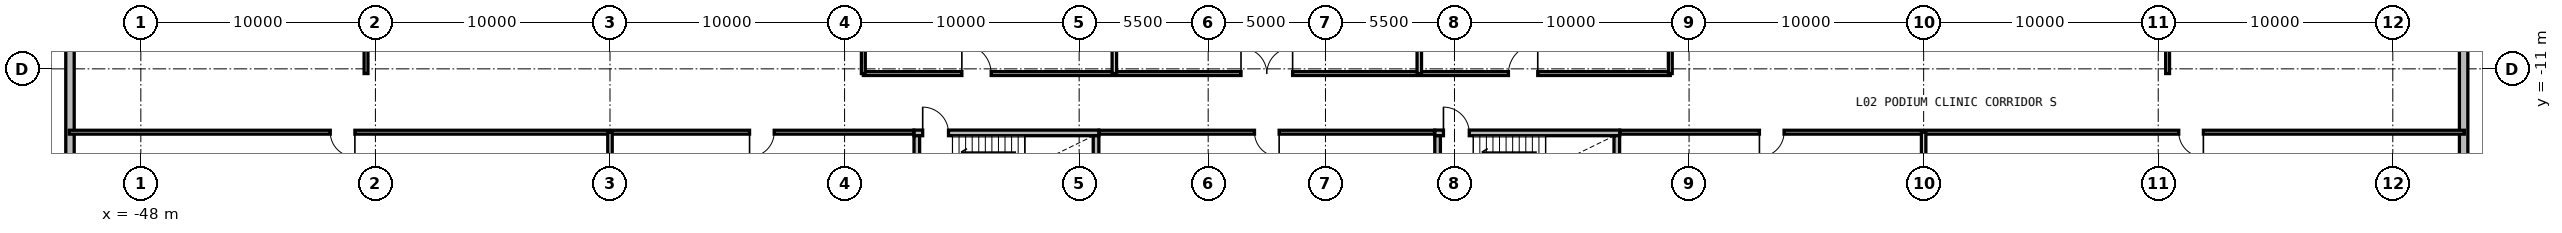
"""IFC4 building model, lengths in metres.
Left out: names, types, materials, properties, quantities, classifications, styles, units other than length and angle.
Written with IfcOpenShell. Run it as: python <this file> out.ifc"""

import sys

from ifc_helpers import new_model, si_unit, direction, frame, frame_2d, origin, place, context, subcontext, project, spatial, rectangle, extrude, source, transform, mapped, element, fill, save


model = new_model("IFC4")
c1 = context("Model", 3, precision=1e-05, world=origin(), true_north=direction((0.0, 1.0)))
c2 = subcontext(c1, "Body", "Model", "MODEL_VIEW")
j1 = project(units=[si_unit("LENGTHUNIT", "METRE"), si_unit("PLANEANGLEUNIT", "RADIAN")], contexts=[c1])
p1 = place(None, origin())
s1 = spatial("IfcSite", under=j1, at=p1, CompositionType="ELEMENT")
p2 = place(p1, origin())
s2 = spatial("IfcBuilding", under=s1, at=p2, CompositionType="ELEMENT")
p3 = place(p2, frame((0.0, 0.0, 8.4)))
s3 = spatial("IfcBuildingStorey", under=s2, at=p3, CompositionType="ELEMENT", Elevation=8.4)
m1 = source(origin(), c2, "Body", "SweptSolid", [
    extrude(rectangle(XDim=43.44, YDim=0.36, at=frame_2d((21.72, 0.0))), origin(), (0.0, 0.0, 1.0), 3.88),
])
p4 = place(p3, frame((-51.02, -21.72, 0.0), z_axis=(0.0, 0.0, 1.0), x_axis=(0.0, 1.0, 0.0)))
e1 = element("IfcWall", 1, at=p4, inside=s3, PredefinedType="SOLIDWALL", context=c2, shape_type="MappedRepresentation", body=[
    mapped(m1, transform((0.0, 0.0, 0.0), x_axis=(1.0, 0.0, 0.0), y_axis=(0.0, 1.0, 0.0), z_axis=(0.0, 0.0, 1.0), scale=1.0)),
])
p5 = place(p4, frame((4.0, 0.0, 0.9)))
e2 = element("IfcOpeningElement", 2, at=p5, cuts=e1, PredefinedType="OPENING", context=c2, shape_type="SweptSolid", body=[
    extrude(rectangle(XDim=1.8, YDim=2.0, at=frame_2d((0.9, 1.0))), frame((0.0, 0.19, 0.0), z_axis=(0.0, -1.0, 0.0), x_axis=(1.0, 0.0, 0.0)), (0.0, 0.0, 1.0), 0.38),
])
p6 = place(p4, frame((12.4, 0.0, 0.85)))
e3 = element("IfcOpeningElement", 3, at=p6, cuts=e1, PredefinedType="OPENING", context=c2, shape_type="SweptSolid", body=[
    extrude(rectangle(XDim=2.4, YDim=2.2, at=frame_2d((1.2, 1.1))), frame((0.0, 0.19, 0.0), z_axis=(0.0, -1.0, 0.0), x_axis=(1.0, 0.0, 0.0)), (0.0, 0.0, 1.0), 0.38),
])
p7 = place(p3, frame((51.02, 21.72, 0.0), z_axis=(0.0, 0.0, 1.0), x_axis=(0.0, -1.0, 0.0)))
e4 = element("IfcWall", 4, at=p7, inside=s3, PredefinedType="SOLIDWALL", context=c2, shape_type="MappedRepresentation", body=[
    mapped(m1, transform((0.0, 0.0, 0.0), x_axis=(1.0, 0.0, 0.0), y_axis=(0.0, 1.0, 0.0), z_axis=(0.0, 0.0, 1.0), scale=1.0)),
])
p8 = place(p7, frame((4.0, 0.0, 0.9)))
e5 = element("IfcOpeningElement", 5, at=p8, cuts=e4, PredefinedType="OPENING", context=c2, shape_type="SweptSolid", body=[
    extrude(rectangle(XDim=1.8, YDim=2.0, at=frame_2d((0.9, 1.0))), frame((0.0, 0.19, 0.0), z_axis=(0.0, -1.0, 0.0), x_axis=(1.0, 0.0, 0.0)), (0.0, 0.0, 1.0), 0.38),
])
p9 = place(p7, frame((29.2, 0.0, 0.9)))
e6 = element("IfcOpeningElement", 6, at=p9, cuts=e4, PredefinedType="OPENING", context=c2, shape_type="SweptSolid", body=[
    extrude(rectangle(XDim=1.8, YDim=2.0, at=frame_2d((0.9, 1.0))), frame((0.0, 0.19, 0.0), z_axis=(0.0, -1.0, 0.0), x_axis=(1.0, 0.0, 0.0)), (0.0, 0.0, 1.0), 0.38),
])
m2 = source(origin(), c2, "Body", "SweptSolid", [
    extrude(rectangle(XDim=7.88, YDim=0.24, at=frame_2d((3.94, 0.0))), origin(), (0.0, 0.0, 1.0), 3.88),
])
p10 = place(p3, frame((-15.04, -13.73, 0.0), z_axis=(0.0, 0.0, 1.0), x_axis=(1.0, 0.0, 0.0)))
e7 = element("IfcWall", 7, at=p10, inside=s3, PredefinedType="PARTITIONING", context=c2, shape_type="MappedRepresentation", body=[
    mapped(m2, transform((0.0, 0.0, 0.0), x_axis=(1.0, 0.0, 0.0), y_axis=(0.0, 1.0, 0.0), z_axis=(0.0, 0.0, 1.0), scale=1.0)),
])
p11 = place(p10, frame((0.37, 0.0, 0.0)))
e8 = element("IfcOpeningElement", 8, at=p11, cuts=e7, PredefinedType="OPENING", context=c2, shape_type="SweptSolid", body=[
    extrude(rectangle(XDim=1.1, YDim=2.15, at=frame_2d((0.55, 1.075))), frame((0.0, 0.13, 0.0), z_axis=(0.0, -1.0, 0.0), x_axis=(1.0, 0.0, 0.0)), (0.0, 0.0, 1.0), 0.26),
])
m3 = source(origin(), c2, "Body", "SweptSolid", [
    extrude(rectangle(XDim=2.95, YDim=0.24, at=frame_2d((1.475, 0.0))), origin(), (0.0, 0.0, 1.0), 3.88),
])
for number, where, z_axis, x_axis in (
    (9, (-14.92, -16.8, 0.0), (0.0, 0.0, 1.0), (0.0, 1.0, 0.0)),
    (10, (-7.28, -16.8, 0.0), (0.0, 0.0, 1.0), (0.0, 1.0, 0.0)),
):
    element("IfcWall", number, at=place(p3, frame(where, z_axis=z_axis, x_axis=x_axis)), inside=s3, PredefinedType="PARTITIONING", context=c2, shape_type="MappedRepresentation", body=[
        mapped(m3, transform((0.0, 0.0, 0.0), x_axis=(1.0, 0.0, 0.0), y_axis=(0.0, 1.0, 0.0), z_axis=(0.0, 0.0, 1.0), scale=1.0)),
    ])
p12 = place(p3, frame((7.16, -13.73, 0.0), z_axis=(0.0, 0.0, 1.0), x_axis=(1.0, 0.0, 0.0)))
e11 = element("IfcWall", 11, at=p12, inside=s3, PredefinedType="PARTITIONING", context=c2, shape_type="MappedRepresentation", body=[
    mapped(m2, transform((0.0, 0.0, 0.0), x_axis=(1.0, 0.0, 0.0), y_axis=(0.0, 1.0, 0.0), z_axis=(0.0, 0.0, 1.0), scale=1.0)),
])
p13 = place(p12, frame((0.37, 0.0, 0.0)))
e12 = element("IfcOpeningElement", 12, at=p13, cuts=e11, PredefinedType="OPENING", context=c2, shape_type="SweptSolid", body=[
    extrude(rectangle(XDim=1.1, YDim=2.15, at=frame_2d((0.55, 1.075))), frame((0.0, 0.13, 0.0), z_axis=(0.0, -1.0, 0.0), x_axis=(1.0, 0.0, 0.0)), (0.0, 0.0, 1.0), 0.26),
])
for number, where, z_axis, x_axis in (
    (13, (7.28, -16.8, 0.0), (0.0, 0.0, 1.0), (0.0, 1.0, 0.0)),
    (14, (14.92, -16.8, 0.0), (0.0, 0.0, 1.0), (0.0, 1.0, 0.0)),
):
    element("IfcWall", number, at=place(p3, frame(where, z_axis=z_axis, x_axis=x_axis)), inside=s3, PredefinedType="PARTITIONING", context=c2, shape_type="MappedRepresentation", body=[
        mapped(m3, transform((0.0, 0.0, 0.0), x_axis=(1.0, 0.0, 0.0), y_axis=(0.0, 1.0, 0.0), z_axis=(0.0, 0.0, 1.0), scale=1.0)),
    ])
m4 = source(origin(), c2, "Body", "SweptSolid", [
    extrude(rectangle(XDim=17.6, YDim=0.165, at=frame_2d((8.8, 0.0))), origin(), (0.0, 0.0, 1.0), 3.865),
])
p14 = place(p3, frame((-38.4, -11.2, 0.0), z_axis=(0.0, 0.0, 1.0), x_axis=(0.0, 1.0, 0.0)))
e15 = element("IfcWall", 15, at=p14, inside=s3, PredefinedType="PARTITIONING", context=c2, shape_type="MappedRepresentation", body=[
    mapped(m4, transform((0.0, 0.0, 0.0), x_axis=(1.0, 0.0, 0.0), y_axis=(0.0, 1.0, 0.0), z_axis=(0.0, 0.0, 1.0), scale=1.0)),
])
p15 = place(p14, frame((4.2, 0.0, 0.0)))
e16 = element("IfcOpeningElement", 16, at=p15, cuts=e15, PredefinedType="OPENING", context=c2, shape_type="SweptSolid", body=[
    extrude(rectangle(XDim=1.25, YDim=2.2, at=frame_2d((0.625, 1.1))), frame((0.0, 0.093, 0.0), z_axis=(0.0, -1.0, 0.0), x_axis=(1.0, 0.0, 0.0)), (0.0, 0.0, 1.0), 0.185),
])
p16 = place(p14, frame((13.5, 0.0, 0.0)))
e17 = element("IfcOpeningElement", 17, at=p16, cuts=e15, PredefinedType="OPENING", context=c2, shape_type="SweptSolid", body=[
    extrude(rectangle(XDim=1.25, YDim=2.2, at=frame_2d((0.625, 1.1))), frame((0.0, 0.093, 0.0), z_axis=(0.0, -1.0, 0.0), x_axis=(1.0, 0.0, 0.0)), (0.0, 0.0, 1.0), 0.185),
])
p17 = place(p3, frame((38.4, -11.2, 0.0), z_axis=(0.0, 0.0, 1.0), x_axis=(0.0, 1.0, 0.0)))
e18 = element("IfcWall", 18, at=p17, inside=s3, PredefinedType="PARTITIONING", context=c2, shape_type="MappedRepresentation", body=[
    mapped(m4, transform((0.0, 0.0, 0.0), x_axis=(1.0, 0.0, 0.0), y_axis=(0.0, 1.0, 0.0), z_axis=(0.0, 0.0, 1.0), scale=1.0)),
])
p18 = place(p17, frame((4.2, 0.0, 0.0)))
e19 = element("IfcOpeningElement", 19, at=p18, cuts=e18, PredefinedType="OPENING", context=c2, shape_type="SweptSolid", body=[
    extrude(rectangle(XDim=1.25, YDim=2.2, at=frame_2d((0.625, 1.1))), frame((0.0, 0.093, 0.0), z_axis=(0.0, -1.0, 0.0), x_axis=(1.0, 0.0, 0.0)), (0.0, 0.0, 1.0), 0.185),
])
p19 = place(p17, frame((13.5, 0.0, 0.0)))
e20 = element("IfcOpeningElement", 20, at=p19, cuts=e18, PredefinedType="OPENING", context=c2, shape_type="SweptSolid", body=[
    extrude(rectangle(XDim=1.25, YDim=2.2, at=frame_2d((0.625, 1.1))), frame((0.0, 0.093, 0.0), z_axis=(0.0, -1.0, 0.0), x_axis=(1.0, 0.0, 0.0)), (0.0, 0.0, 1.0), 0.185),
])
m5 = source(origin(), c2, "Body", "SweptSolid", [
    extrude(rectangle(XDim=34.4, YDim=0.165, at=frame_2d((17.2, 0.0))), origin(), (0.0, 0.0, 1.0), 3.865),
])
p20 = place(p3, frame((-17.2, -11.2, 0.0), z_axis=(0.0, 0.0, 1.0), x_axis=(1.0, 0.0, 0.0)))
e21 = element("IfcWall", 21, at=p20, inside=s3, PredefinedType="PARTITIONING", context=c2, shape_type="MappedRepresentation", body=[
    mapped(m5, transform((0.0, 0.0, 0.0), x_axis=(1.0, 0.0, 0.0), y_axis=(0.0, 1.0, 0.0), z_axis=(0.0, 0.0, 1.0), scale=1.0)),
])
p21 = place(p20, frame((4.2, 0.0, 0.0)))
e22 = element("IfcOpeningElement", 22, at=p21, cuts=e21, PredefinedType="OPENING", context=c2, shape_type="SweptSolid", body=[
    extrude(rectangle(XDim=1.25, YDim=2.2, at=frame_2d((0.625, 1.1))), frame((0.0, 0.093, 0.0), z_axis=(0.0, -1.0, 0.0), x_axis=(1.0, 0.0, 0.0)), (0.0, 0.0, 1.0), 0.185),
])
p22 = place(p20, frame((16.1, 0.0, 0.0)))
e23 = element("IfcOpeningElement", 23, at=p22, cuts=e21, PredefinedType="OPENING", context=c2, shape_type="SweptSolid", body=[
    extrude(rectangle(XDim=2.2, YDim=2.4, at=frame_2d((1.1, 1.2))), frame((0.0, 0.093, 0.0), z_axis=(0.0, -1.0, 0.0), x_axis=(1.0, 0.0, 0.0)), (0.0, 0.0, 1.0), 0.185),
])
p23 = place(p20, frame((27.5, 0.0, 0.0)))
e24 = element("IfcOpeningElement", 24, at=p23, cuts=e21, PredefinedType="OPENING", context=c2, shape_type="SweptSolid", body=[
    extrude(rectangle(XDim=1.25, YDim=2.2, at=frame_2d((0.625, 1.1))), frame((0.0, 0.093, 0.0), z_axis=(0.0, -1.0, 0.0), x_axis=(1.0, 0.0, 0.0)), (0.0, 0.0, 1.0), 0.185),
])
for number, where, z_axis, x_axis in (
    (25, (-17.2, -11.2, 0.0), (0.0, 0.0, 1.0), (0.0, 1.0, 0.0)),
    (26, (17.2, -11.2, 0.0), (0.0, 0.0, 1.0), (0.0, 1.0, 0.0)),
):
    element("IfcWall", number, at=place(p3, frame(where, z_axis=z_axis, x_axis=x_axis)), inside=s3, PredefinedType="PARTITIONING", context=c2, shape_type="MappedRepresentation", body=[
        mapped(m4, transform((0.0, 0.0, 0.0), x_axis=(1.0, 0.0, 0.0), y_axis=(0.0, 1.0, 0.0), z_axis=(0.0, 0.0, 1.0), scale=1.0)),
    ])
m6 = source(origin(), c2, "Body", "SweptSolid", [
    extrude(rectangle(XDim=17.6, YDim=0.19, at=frame_2d((8.8, 0.0))), origin(), (0.0, 0.0, 1.0), 3.215),
])
for number, where, z_axis, x_axis in (
    (27, (-6.5, -11.2, 0.0), (0.0, 0.0, 1.0), (0.0, 1.0, 0.0)),
    (28, (6.5, -11.2, 0.0), (0.0, 0.0, 1.0), (0.0, 1.0, 0.0)),
):
    element("IfcWall", number, at=place(p3, frame(where, z_axis=z_axis, x_axis=x_axis)), inside=s3, PredefinedType="PARTITIONING", context=c2, shape_type="MappedRepresentation", body=[
        mapped(m6, transform((0.0, 0.0, 0.0), x_axis=(1.0, 0.0, 0.0), y_axis=(0.0, 1.0, 0.0), z_axis=(0.0, 0.0, 1.0), scale=1.0)),
    ])
m7 = source(origin(), c2, "Body", "SweptSolid", [
    extrude(rectangle(XDim=36.0, YDim=0.165, at=frame_2d((18.0, 0.0))), origin(), (0.0, 0.0, 1.0), 3.865),
])
p24 = place(p3, frame((-51.05, -13.7, 0.0), z_axis=(0.0, 0.0, 1.0), x_axis=(1.0, 0.0, 0.0)))
e29 = element("IfcWall", 29, at=p24, inside=s3, PredefinedType="PARTITIONING", context=c2, shape_type="MappedRepresentation", body=[
    mapped(m7, transform((0.0, 0.0, 0.0), x_axis=(1.0, 0.0, 0.0), y_axis=(0.0, 1.0, 0.0), z_axis=(0.0, 0.0, 1.0), scale=1.0)),
])
p25 = place(p24, frame((11.125, 0.0, 0.0)))
e30 = element("IfcOpeningElement", 30, at=p25, cuts=e29, PredefinedType="OPENING", context=c2, shape_type="SweptSolid", body=[
    extrude(rectangle(XDim=1.05, YDim=2.15, at=frame_2d((0.525, 1.075))), frame((0.0, 0.093, 0.0), z_axis=(0.0, -1.0, 0.0), x_axis=(1.0, 0.0, 0.0)), (0.0, 0.0, 1.0), 0.185),
])
p26 = place(p24, frame((29.0, 0.0, 0.0)))
e31 = element("IfcOpeningElement", 31, at=p26, cuts=e29, PredefinedType="OPENING", context=c2, shape_type="SweptSolid", body=[
    extrude(rectangle(XDim=1.05, YDim=2.15, at=frame_2d((0.525, 1.075))), frame((0.0, 0.093, 0.0), z_axis=(0.0, -1.0, 0.0), x_axis=(1.0, 0.0, 0.0)), (0.0, 0.0, 1.0), 0.185),
])
m8 = source(origin(), c2, "Body", "SweptSolid", [
    extrude(rectangle(XDim=14.3, YDim=0.165, at=frame_2d((7.15, 0.0))), origin(), (0.0, 0.0, 1.0), 3.865),
])
p27 = place(p3, frame((-7.15, -13.7, 0.0), z_axis=(0.0, 0.0, 1.0), x_axis=(1.0, 0.0, 0.0)))
e32 = element("IfcWall", 32, at=p27, inside=s3, PredefinedType="PARTITIONING", context=c2, shape_type="MappedRepresentation", body=[
    mapped(m8, transform((0.0, 0.0, 0.0), x_axis=(1.0, 0.0, 0.0), y_axis=(0.0, 1.0, 0.0), z_axis=(0.0, 0.0, 1.0), scale=1.0)),
])
p28 = place(p27, frame((6.625, 0.0, 0.0)))
e33 = element("IfcOpeningElement", 33, at=p28, cuts=e32, PredefinedType="OPENING", context=c2, shape_type="SweptSolid", body=[
    extrude(rectangle(XDim=1.05, YDim=2.15, at=frame_2d((0.525, 1.075))), frame((0.0, 0.093, 0.0), z_axis=(0.0, -1.0, 0.0), x_axis=(1.0, 0.0, 0.0)), (0.0, 0.0, 1.0), 0.185),
])
p29 = place(p3, frame((15.05, -13.7, 0.0), z_axis=(0.0, 0.0, 1.0), x_axis=(1.0, 0.0, 0.0)))
e34 = element("IfcWall", 34, at=p29, inside=s3, PredefinedType="PARTITIONING", context=c2, shape_type="MappedRepresentation", body=[
    mapped(m7, transform((0.0, 0.0, 0.0), x_axis=(1.0, 0.0, 0.0), y_axis=(0.0, 1.0, 0.0), z_axis=(0.0, 0.0, 1.0), scale=1.0)),
])
p30 = place(p29, frame((5.95, 0.0, 0.0)))
e35 = element("IfcOpeningElement", 35, at=p30, cuts=e34, PredefinedType="OPENING", context=c2, shape_type="SweptSolid", body=[
    extrude(rectangle(XDim=1.05, YDim=2.15, at=frame_2d((0.525, 1.075))), frame((0.0, 0.093, 0.0), z_axis=(0.0, -1.0, 0.0), x_axis=(1.0, 0.0, 0.0)), (0.0, 0.0, 1.0), 0.185),
])
p31 = place(p29, frame((23.825, 0.0, 0.0)))
e36 = element("IfcOpeningElement", 36, at=p31, cuts=e34, PredefinedType="OPENING", context=c2, shape_type="SweptSolid", body=[
    extrude(rectangle(XDim=1.05, YDim=2.15, at=frame_2d((0.525, 1.075))), frame((0.0, 0.093, 0.0), z_axis=(0.0, -1.0, 0.0), x_axis=(1.0, 0.0, 0.0)), (0.0, 0.0, 1.0), 0.185),
])
m9 = source(origin(), c2, "Body", "SweptSolid", [
    extrude(rectangle(XDim=8.1, YDim=0.19, at=frame_2d((4.05, 0.0))), origin(), (0.0, 0.0, 1.0), 3.865),
])
for number, where, z_axis, x_axis in (
    (37, (-28.0, -21.8, 0.0), (0.0, 0.0, 1.0), (0.0, 1.0, 0.0)),
    (38, (28.0, -21.8, 0.0), (0.0, 0.0, 1.0), (0.0, 1.0, 0.0)),
):
    element("IfcWall", number, at=place(p3, frame(where, z_axis=z_axis, x_axis=x_axis)), inside=s3, PredefinedType="PARTITIONING", context=c2, shape_type="MappedRepresentation", body=[
        mapped(m9, transform((0.0, 0.0, 0.0), x_axis=(1.0, 0.0, 0.0), y_axis=(0.0, 1.0, 0.0), z_axis=(0.0, 0.0, 1.0), scale=1.0)),
    ])
m10 = source(origin(), c2, "Body", "SweptSolid", [
    extrude(rectangle(XDim=1.1, YDim=2.15, at=frame_2d((0.55, 1.075))), frame((0.0, 0.025, 0.0), z_axis=(0.0, -1.0, 0.0), x_axis=(1.0, 0.0, 0.0)), (0.0, 0.0, 1.0), 0.05),
])
p32 = place(p11, origin())
e39 = element("IfcDoor", 39, at=p32, inside=s3, OperationType="SINGLE_SWING_LEFT", PredefinedType="DOOR", context=c2, shape_type="MappedRepresentation", body=[
    mapped(m10, transform((0.0, 0.0, 0.0), x_axis=(1.0, 0.0, 0.0), y_axis=(0.0, 1.0, 0.0), z_axis=(0.0, 0.0, 1.0), scale=1.0)),
])
fill(e8, e39)
p33 = place(p13, origin())
e40 = element("IfcDoor", 40, at=p33, inside=s3, OperationType="SINGLE_SWING_LEFT", PredefinedType="DOOR", context=c2, shape_type="MappedRepresentation", body=[
    mapped(m10, transform((0.0, 0.0, 0.0), x_axis=(1.0, 0.0, 0.0), y_axis=(0.0, 1.0, 0.0), z_axis=(0.0, 0.0, 1.0), scale=1.0)),
])
fill(e12, e40)
m11 = source(origin(), c2, "Body", "SweptSolid", [
    extrude(rectangle(XDim=1.25, YDim=2.2, at=frame_2d((0.625, 1.1))), frame((0.0, 0.025, 0.0), z_axis=(0.0, -1.0, 0.0), x_axis=(1.0, 0.0, 0.0)), (0.0, 0.0, 1.0), 0.05),
])
p34 = place(p21, origin())
e41 = element("IfcDoor", 41, at=p34, inside=s3, OperationType="SINGLE_SWING_LEFT", PredefinedType="DOOR", context=c2, shape_type="MappedRepresentation", body=[
    mapped(m11, transform((0.0, 0.0, 0.0), x_axis=(1.0, 0.0, 0.0), y_axis=(0.0, 1.0, 0.0), z_axis=(0.0, 0.0, 1.0), scale=1.0)),
])
fill(e22, e41)
m12 = source(origin(), c2, "Body", "SweptSolid", [
    extrude(rectangle(XDim=2.2, YDim=2.4, at=frame_2d((1.1, 1.2))), frame((0.0, 0.025, 0.0), z_axis=(0.0, -1.0, 0.0), x_axis=(1.0, 0.0, 0.0)), (0.0, 0.0, 1.0), 0.05),
])
p35 = place(p22, origin())
e42 = element("IfcDoor", 42, at=p35, inside=s3, OperationType="DOUBLE_DOOR_SINGLE_SWING", PredefinedType="DOOR", context=c2, shape_type="MappedRepresentation", body=[
    mapped(m12, transform((0.0, 0.0, 0.0), x_axis=(1.0, 0.0, 0.0), y_axis=(0.0, 1.0, 0.0), z_axis=(0.0, 0.0, 1.0), scale=1.0)),
])
fill(e23, e42)
p36 = place(p23, origin())
e43 = element("IfcDoor", 43, at=p36, inside=s3, OperationType="SINGLE_SWING_RIGHT", PredefinedType="DOOR", context=c2, shape_type="MappedRepresentation", body=[
    mapped(m11, transform((0.0, 0.0, 0.0), x_axis=(1.0, 0.0, 0.0), y_axis=(0.0, 1.0, 0.0), z_axis=(0.0, 0.0, 1.0), scale=1.0)),
])
fill(e24, e43)
m13 = source(origin(), c2, "Body", "SweptSolid", [
    extrude(rectangle(XDim=1.05, YDim=2.15, at=frame_2d((0.525, 1.075))), frame((0.0, 0.025, 0.0), z_axis=(0.0, -1.0, 0.0), x_axis=(1.0, 0.0, 0.0)), (0.0, 0.0, 1.0), 0.05),
])
p37 = place(p25, frame((1.05, 0.0, 0.0), z_axis=(0.0, 0.0, 1.0), x_axis=(-1.0, 0.0, 0.0)))
e44 = element("IfcDoor", 44, at=p37, inside=s3, OperationType="SINGLE_SWING_LEFT", PredefinedType="DOOR", context=c2, shape_type="MappedRepresentation", body=[
    mapped(m13, transform((0.0, 0.0, 0.0), x_axis=(1.0, 0.0, 0.0), y_axis=(0.0, 1.0, 0.0), z_axis=(0.0, 0.0, 1.0), scale=1.0)),
])
fill(e30, e44)
p38 = place(p26, frame((1.05, 0.0, 0.0), z_axis=(0.0, 0.0, 1.0), x_axis=(-1.0, 0.0, 0.0)))
e45 = element("IfcDoor", 45, at=p38, inside=s3, OperationType="SINGLE_SWING_RIGHT", PredefinedType="DOOR", context=c2, shape_type="MappedRepresentation", body=[
    mapped(m13, transform((0.0, 0.0, 0.0), x_axis=(1.0, 0.0, 0.0), y_axis=(0.0, 1.0, 0.0), z_axis=(0.0, 0.0, 1.0), scale=1.0)),
])
fill(e31, e45)
p39 = place(p28, frame((1.05, 0.0, 0.0), z_axis=(0.0, 0.0, 1.0), x_axis=(-1.0, 0.0, 0.0)))
e46 = element("IfcDoor", 46, at=p39, inside=s3, OperationType="SINGLE_SWING_LEFT", PredefinedType="DOOR", context=c2, shape_type="MappedRepresentation", body=[
    mapped(m13, transform((0.0, 0.0, 0.0), x_axis=(1.0, 0.0, 0.0), y_axis=(0.0, 1.0, 0.0), z_axis=(0.0, 0.0, 1.0), scale=1.0)),
])
fill(e33, e46)
p40 = place(p30, frame((1.05, 0.0, 0.0), z_axis=(0.0, 0.0, 1.0), x_axis=(-1.0, 0.0, 0.0)))
e47 = element("IfcDoor", 47, at=p40, inside=s3, OperationType="SINGLE_SWING_RIGHT", PredefinedType="DOOR", context=c2, shape_type="MappedRepresentation", body=[
    mapped(m13, transform((0.0, 0.0, 0.0), x_axis=(1.0, 0.0, 0.0), y_axis=(0.0, 1.0, 0.0), z_axis=(0.0, 0.0, 1.0), scale=1.0)),
])
fill(e35, e47)
p41 = place(p31, frame((1.05, 0.0, 0.0), z_axis=(0.0, 0.0, 1.0), x_axis=(-1.0, 0.0, 0.0)))
e48 = element("IfcDoor", 48, at=p41, inside=s3, OperationType="SINGLE_SWING_LEFT", PredefinedType="DOOR", context=c2, shape_type="MappedRepresentation", body=[
    mapped(m13, transform((0.0, 0.0, 0.0), x_axis=(1.0, 0.0, 0.0), y_axis=(0.0, 1.0, 0.0), z_axis=(0.0, 0.0, 1.0), scale=1.0)),
])
fill(e36, e48)
save(model, sys.argv[1])
